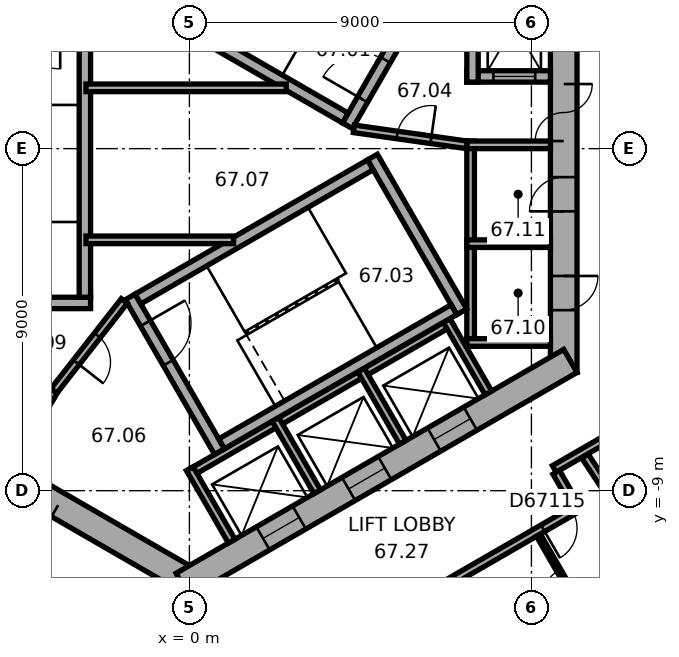
"""IFC4 building model, lengths in metres.
Left out: names, types, materials, properties, quantities, classifications, styles, units other than length and angle.
Written with IfcOpenShell. Run it as: python <this file> out.ifc"""

import sys

from ifc_helpers import new_model, si_unit, direction, frame, frame_2d, origin, place, context, subcontext, project, spatial, rectangle, extrude, element, fill, save


model = new_model("IFC4")
c1 = context("Model", 3, precision=1e-05, world=origin(), true_north=direction((0.0, 1.0)))
c2 = subcontext(c1, "Body", "Model", "MODEL_VIEW")
j1 = project(units=[si_unit("LENGTHUNIT", "METRE"), si_unit("PLANEANGLEUNIT", "RADIAN")], contexts=[c1])
p1 = place(None, origin())
s1 = spatial("IfcSite", under=j1, at=p1, CompositionType="ELEMENT")
p2 = place(p1, origin())
s2 = spatial("IfcBuilding", under=s1, at=p2, CompositionType="ELEMENT")
p3 = place(p2, frame((0.0, 0.0, 270.9)))
s3 = spatial("IfcBuildingStorey", under=s2, at=p3, CompositionType="ELEMENT", Elevation=270.9)
p4 = place(p3, frame((9.85, -5.889, 0.0), z_axis=(0.0, 0.0, 1.0), x_axis=(0.0, 1.0, 0.0)))
e1 = element("IfcWall", 1, at=p4, inside=s3, PredefinedType="SHEAR", context=c2, shape_type="SweptSolid", body=[
    extrude(rectangle(XDim=11.778, YDim=0.7, at=frame_2d((5.889, 0.0))), origin(), (0.0, 0.0, 1.0), 3.7),
])
p5 = place(p4, frame((6.089, 0.0, 0.0)))
e2 = element("IfcOpeningElement", 2, at=p5, cuts=e1, PredefinedType="OPENING", context=c2, shape_type="SweptSolid", body=[
    extrude(rectangle(XDim=1.5, YDim=2.1, at=frame_2d((0.75, 1.05))), frame((0.0, 0.36, 0.0), z_axis=(0.0, -1.0, 0.0), x_axis=(1.0, 0.0, 0.0)), (0.0, 0.0, 1.0), 0.72),
])
p6 = place(p4, frame((1.639, 0.0, 0.0)))
e3 = element("IfcOpeningElement", 3, at=p6, cuts=e1, PredefinedType="OPENING", context=c2, shape_type="SweptSolid", body=[
    extrude(rectangle(XDim=0.9, YDim=2.1, at=frame_2d((0.45, 1.05))), frame((0.0, 0.36, 0.0), z_axis=(0.0, -1.0, 0.0), x_axis=(1.0, 0.0, 0.0)), (0.0, 0.0, 1.0), 0.72),
])
p7 = place(p4, frame((4.239, 0.0, 0.0)))
e4 = element("IfcOpeningElement", 4, at=p7, cuts=e1, PredefinedType="OPENING", context=c2, shape_type="SweptSolid", body=[
    extrude(rectangle(XDim=0.9, YDim=2.1, at=frame_2d((0.45, 1.05))), frame((0.0, 0.36, 0.0), z_axis=(0.0, -1.0, 0.0), x_axis=(1.0, 0.0, 0.0)), (0.0, 0.0, 1.0), 0.72),
])
p8 = place(p3, frame((-10.025, -5.586, 0.0), z_axis=(0.0, 0.0, 1.0), x_axis=(0.866026453023, -0.499998182661, 0.0)))
e5 = element("IfcWall", 5, at=p8, inside=s3, PredefinedType="SHEAR", context=c2, shape_type="SweptSolid", body=[
    extrude(rectangle(XDim=11.778, YDim=0.7, at=frame_2d((5.889, 0.0))), origin(), (0.0, 0.0, 1.0), 3.7),
])
p9 = place(p8, frame((6.089, 0.0, 0.0)))
e6 = element("IfcOpeningElement", 6, at=p9, cuts=e5, PredefinedType="OPENING", context=c2, shape_type="SweptSolid", body=[
    extrude(rectangle(XDim=1.5, YDim=2.1, at=frame_2d((0.75, 1.05))), frame((0.0, 0.36, 0.0), z_axis=(0.0, -1.0, 0.0), x_axis=(1.0, 0.0, 0.0)), (0.0, 0.0, 1.0), 0.72),
])
p10 = place(p8, frame((1.539, 0.0, 0.0)))
e7 = element("IfcOpeningElement", 7, at=p10, cuts=e5, PredefinedType="OPENING", context=c2, shape_type="SweptSolid", body=[
    extrude(rectangle(XDim=1.1, YDim=2.1, at=frame_2d((0.55, 1.05))), frame((0.0, 0.36, 0.0), z_axis=(0.0, -1.0, 0.0), x_axis=(1.0, 0.0, 0.0)), (0.0, 0.0, 1.0), 0.72),
])
p11 = place(p8, frame((4.139, 0.0, 0.0)))
e8 = element("IfcOpeningElement", 8, at=p11, cuts=e5, PredefinedType="OPENING", context=c2, shape_type="SweptSolid", body=[
    extrude(rectangle(XDim=1.1, YDim=2.1, at=frame_2d((0.55, 1.05))), frame((0.0, 0.36, 0.0), z_axis=(0.0, -1.0, 0.0), x_axis=(1.0, 0.0, 0.0)), (0.0, 0.0, 1.0), 0.72),
])
p12 = place(p3, frame((-0.175, -11.475, 0.0), z_axis=(0.0, 0.0, 1.0), x_axis=(0.866026453023, 0.499998182661, 0.0)))
e9 = element("IfcWall", 9, at=p12, inside=s3, PredefinedType="SHEAR", context=c2, shape_type="SweptSolid", body=[
    extrude(rectangle(XDim=11.778, YDim=0.7, at=frame_2d((5.889, 0.0))), origin(), (0.0, 0.0, 1.0), 3.7),
])
p13 = place(p12, frame((2.439, 0.0, 0.0)))
e10 = element("IfcOpeningElement", 10, at=p13, cuts=e9, PredefinedType="OPENING", context=c2, shape_type="SweptSolid", body=[
    extrude(rectangle(XDim=1.1, YDim=2.1, at=frame_2d((0.55, 1.05))), frame((0.0, 0.36, 0.0), z_axis=(0.0, -1.0, 0.0), x_axis=(1.0, 0.0, 0.0)), (0.0, 0.0, 1.0), 0.72),
])
p14 = place(p12, frame((5.039, 0.0, 0.0)))
e11 = element("IfcOpeningElement", 11, at=p14, cuts=e9, PredefinedType="OPENING", context=c2, shape_type="SweptSolid", body=[
    extrude(rectangle(XDim=1.1, YDim=2.1, at=frame_2d((0.55, 1.05))), frame((0.0, 0.36, 0.0), z_axis=(0.0, -1.0, 0.0), x_axis=(1.0, 0.0, 0.0)), (0.0, 0.0, 1.0), 0.72),
])
p15 = place(p12, frame((7.639, 0.0, 0.0)))
e12 = element("IfcOpeningElement", 12, at=p15, cuts=e9, PredefinedType="OPENING", context=c2, shape_type="SweptSolid", body=[
    extrude(rectangle(XDim=1.1, YDim=2.1, at=frame_2d((0.55, 1.05))), frame((0.0, 0.36, 0.0), z_axis=(0.0, -1.0, 0.0), x_axis=(1.0, 0.0, 0.0)), (0.0, 0.0, 1.0), 0.72),
])
p16 = place(p3, frame((7.4, -5.2, 0.0), z_axis=(0.0, 0.0, 1.0), x_axis=(0.0, 1.0, 0.0)))
e13 = element("IfcWall", 13, at=p16, inside=s3, PredefinedType="PARTITIONING", context=c2, shape_type="SweptSolid", body=[
    extrude(rectangle(XDim=5.4, YDim=0.2, at=frame_2d((2.7, 0.0))), origin(), (0.0, 0.0, 1.0), 3.42),
])
for number, where, z_axis, x_axis in (
    (14, (7.3, -5.1, 0.0), (0.0, 0.0, 1.0), (1.0, 0.0, 0.0)),
    (15, (7.3, -2.5, 0.0), (0.0, 0.0, 1.0), (1.0, 0.0, 0.0)),
    (16, (7.3, 0.1, 0.0), (0.0, 0.0, 1.0), (1.0, 0.0, 0.0)),
):
    element("IfcWall", number, at=place(p3, frame(where, z_axis=z_axis, x_axis=x_axis)), inside=s3, PredefinedType="PARTITIONING", context=c2, shape_type="SweptSolid", body=[
        extrude(rectangle(XDim=2.2, YDim=0.2, at=frame_2d((1.1, 0.0))), origin(), (0.0, 0.0, 1.0), 3.42),
    ])
p17 = place(p3, frame((-8.203, -3.809, 0.0), z_axis=(0.0, 0.0, 1.0), x_axis=(0.866028230842, -0.499995103361, 0.0)))
e17 = element("IfcWall", 17, at=p17, inside=s3, PredefinedType="PARTITIONING", context=c2, shape_type="SweptSolid", body=[
    extrude(rectangle(XDim=5.4, YDim=0.2, at=frame_2d((2.7, 0.0))), origin(), (0.0, 0.0, 1.0), 3.42),
])
p18 = place(p3, frame((-3.563, -6.372, 0.0), z_axis=(0.0, 0.0, 1.0), x_axis=(-0.499994660107, -0.866028486751, 0.0)))
e18 = element("IfcWall", 18, at=p18, inside=s3, PredefinedType="PARTITIONING", context=c2, shape_type="SweptSolid", body=[
    extrude(rectangle(XDim=2.2, YDim=0.2, at=frame_2d((1.1, 0.0))), origin(), (0.0, 0.0, 1.0), 3.42),
])
p19 = place(p3, frame((-0.024, -8.559, 0.0), z_axis=(0.0, 0.0, 1.0), x_axis=(0.866026010844, 0.49999894854, 0.0)))
e19 = element("IfcWall", 19, at=p19, inside=s3, PredefinedType="PARTITIONING", context=c2, shape_type="SweptSolid", body=[
    extrude(rectangle(XDim=8.0, YDim=0.2, at=frame_2d((4.0, 0.0))), origin(), (0.0, 0.0, 1.0), 3.42),
])
for number, where, z_axis, x_axis in (
    (20, (0.013, -8.422, 0.0), (0.0, 0.0, 1.0), (0.5, -0.866, 0.0)),
    (21, (2.264, -7.122, 0.0), (0.0, 0.0, 1.0), (0.5, -0.866, 0.0)),
    (22, (4.516, -5.822, 0.0), (0.0, 0.0, 1.0), (0.5, -0.866, 0.0)),
    (23, (6.768, -4.522, 0.0), (0.0, 0.0, 1.0), (0.5, -0.866, 0.0)),
):
    element("IfcWall", number, at=place(p3, frame(where, z_axis=z_axis, x_axis=x_axis)), inside=s3, PredefinedType="PARTITIONING", context=c2, shape_type="SweptSolid", body=[
        extrude(rectangle(XDim=2.2, YDim=0.2, at=frame_2d((1.1, 0.0))), origin(), (0.0, 0.0, 1.0), 3.42),
    ])
p20 = place(p3, frame((4.158, 0.602, 0.0), z_axis=(0.0, 0.0, 1.0), x_axis=(0.499977259774, 0.866038532462, 0.0)))
e24 = element("IfcWall", 24, at=p20, inside=s3, PredefinedType="SHEAR", context=c2, shape_type="SweptSolid", body=[
    extrude(rectangle(XDim=4.7, YDim=0.3, at=frame_2d((2.35, 0.0))), origin(), (0.0, 0.0, 1.0), 3.42),
])
p21 = place(p20, frame((0.8, 0.0, 0.0)))
e25 = element("IfcOpeningElement", 25, at=p21, cuts=e24, PredefinedType="OPENING", context=c2, shape_type="SweptSolid", body=[
    extrude(rectangle(XDim=1.2, YDim=2.1, at=frame_2d((0.6, 1.05))), frame((0.0, 0.16, 0.0), z_axis=(0.0, -1.0, 0.0), x_axis=(1.0, 0.0, 0.0)), (0.0, 0.0, 1.0), 0.32),
])
p22 = place(p3, frame((4.103, 0.807, 0.0), z_axis=(0.0, 0.0, 1.0), x_axis=(-0.866027801685, 0.499995846692, 0.0)))
e26 = element("IfcWall", 26, at=p22, inside=s3, PredefinedType="SHEAR", context=c2, shape_type="SweptSolid", body=[
    extrude(rectangle(XDim=7.06, YDim=0.3, at=frame_2d((3.53, 0.0))), origin(), (0.0, 0.0, 1.0), 3.42),
])
p23 = place(p3, frame((-2.6, -4.06, 0.0), z_axis=(0.0, 0.0, 1.0), x_axis=(-1.0, 0.0, 0.0)))
e27 = element("IfcWall", 27, at=p23, inside=s3, PredefinedType="SHEAR", context=c2, shape_type="SweptSolid", body=[
    extrude(rectangle(XDim=4.7, YDim=0.3, at=frame_2d((2.35, 0.0))), origin(), (0.0, 0.0, 1.0), 3.42),
])
p24 = place(p3, frame((-2.75, 3.15, 0.0), z_axis=(0.0, 0.0, 1.0), x_axis=(0.0, -1.0, 0.0)))
e28 = element("IfcWall", 28, at=p24, inside=s3, PredefinedType="SHEAR", context=c2, shape_type="SweptSolid", body=[
    extrude(rectangle(XDim=7.06, YDim=0.3, at=frame_2d((3.53, 0.0))), origin(), (0.0, 0.0, 1.0), 3.42),
])
p25 = place(p3, frame((-1.558, -3.902, 0.0), z_axis=(0.0, 0.0, 1.0), x_axis=(0.499977259774, -0.866038532462, 0.0)))
e29 = element("IfcWall", 29, at=p25, inside=s3, PredefinedType="SHEAR", context=c2, shape_type="SweptSolid", body=[
    extrude(rectangle(XDim=4.7, YDim=0.3, at=frame_2d((2.35, 0.0))), origin(), (0.0, 0.0, 1.0), 3.42),
])
p26 = place(p25, frame((0.8, 0.0, 0.0)))
e30 = element("IfcOpeningElement", 30, at=p26, cuts=e29, PredefinedType="OPENING", context=c2, shape_type="SweptSolid", body=[
    extrude(rectangle(XDim=1.2, YDim=2.1, at=frame_2d((0.6, 1.05))), frame((0.0, 0.16, 0.0), z_axis=(0.0, -1.0, 0.0), x_axis=(1.0, 0.0, 0.0)), (0.0, 0.0, 1.0), 0.32),
])
p27 = place(p3, frame((4.816, -0.222, 0.0), z_axis=(0.0, 0.0, 1.0), x_axis=(0.499977259774, -0.866038532462, 0.0)))
e31 = element("IfcWall", 31, at=p27, inside=s3, PredefinedType="SHEAR", context=c2, shape_type="SweptSolid", body=[
    extrude(rectangle(XDim=4.7, YDim=0.3, at=frame_2d((2.35, 0.0))), origin(), (0.0, 0.0, 1.0), 3.42),
])
for number, where, z_axis, x_axis in (
    (32, (-1.353, -3.957, 0.0), (0.0, 0.0, 1.0), (0.866, 0.5, 0.0)),
    (33, (0.847, -7.767, 0.0), (0.0, 0.0, 1.0), (0.866, 0.5, 0.0)),
):
    element("IfcWall", number, at=place(p3, frame(where, z_axis=z_axis, x_axis=x_axis)), inside=s3, PredefinedType="SHEAR", context=c2, shape_type="SweptSolid", body=[
        extrude(rectangle(XDim=7.06, YDim=0.3, at=frame_2d((3.53, 0.0))), origin(), (0.0, 0.0, 1.0), 3.42),
    ])
p28 = place(p3, frame((7.3, 1.9, 0.0), z_axis=(0.0, 0.0, 1.0), x_axis=(1.0, 0.0, 0.0)))
e34 = element("IfcWall", 34, at=p28, inside=s3, PredefinedType="SHEAR", context=c2, shape_type="SweptSolid", body=[
    extrude(rectangle(XDim=2.2, YDim=0.3, at=frame_2d((1.1, 0.0))), origin(), (0.0, 0.0, 1.0), 3.42),
])
p29 = place(p28, frame((0.7, 0.0, 0.0)))
e35 = element("IfcOpeningElement", 35, at=p29, cuts=e34, PredefinedType="OPENING", context=c2, shape_type="SweptSolid", body=[
    extrude(rectangle(XDim=1.1, YDim=2.1, at=frame_2d((0.55, 1.05))), frame((0.0, 0.16, 0.0), z_axis=(0.0, -1.0, 0.0), x_axis=(1.0, 0.0, 0.0)), (0.0, 0.0, 1.0), 0.32),
])
p30 = place(p3, frame((7.45, 1.75, 0.0), z_axis=(0.0, 0.0, 1.0), x_axis=(0.0, 1.0, 0.0)))
e36 = element("IfcWall", 36, at=p30, inside=s3, PredefinedType="SHEAR", context=c2, shape_type="SweptSolid", body=[
    extrude(rectangle(XDim=3.35, YDim=0.3, at=frame_2d((1.675, 0.0))), origin(), (0.0, 0.0, 1.0), 3.42),
])
p31 = place(p3, frame((4.327, 0.521, 0.0), z_axis=(0.0, 0.0, 1.0), x_axis=(0.990124376366, -0.14019172346, 0.0)))
e37 = element("IfcWall", 37, at=p31, inside=s3, PredefinedType="PARTITIONING", context=c2, shape_type="SweptSolid", body=[
    extrude(rectangle(XDim=3.002, YDim=0.2, at=frame_2d((1.501, 0.0))), origin(), (0.0, 0.0, 1.0), 3.42),
])
p32 = place(p31, frame((1.15, 0.0, 0.0)))
e38 = element("IfcOpeningElement", 38, at=p32, cuts=e37, PredefinedType="OPENING", context=c2, shape_type="SweptSolid", body=[
    extrude(rectangle(XDim=0.9, YDim=2.1, at=frame_2d((0.45, 1.05))), frame((0.0, 0.11, 0.0), z_axis=(0.0, -1.0, 0.0), x_axis=(1.0, 0.0, 0.0)), (0.0, 0.0, 1.0), 0.22),
])
p33 = place(p3, frame((-1.712, -4.008, 0.0), z_axis=(0.0, 0.0, 1.0), x_axis=(-0.616549420702, -0.787316208287, 0.0)))
e39 = element("IfcWall", 39, at=p33, inside=s3, PredefinedType="PARTITIONING", context=c2, shape_type="SweptSolid", body=[
    extrude(rectangle(XDim=3.002, YDim=0.2, at=frame_2d((1.501, 0.0))), origin(), (0.0, 0.0, 1.0), 3.42),
])
p34 = place(p33, frame((1.15, 0.0, 0.0)))
e40 = element("IfcOpeningElement", 40, at=p34, cuts=e39, PredefinedType="OPENING", context=c2, shape_type="SweptSolid", body=[
    extrude(rectangle(XDim=0.9, YDim=2.1, at=frame_2d((0.45, 1.05))), frame((0.0, 0.11, 0.0), z_axis=(0.0, -1.0, 0.0), x_axis=(1.0, 0.0, 0.0)), (0.0, 0.0, 1.0), 0.22),
])
p35 = place(p3, frame((-2.72, -2.4, 0.0), z_axis=(0.0, 0.0, 1.0), x_axis=(1.0, 0.0, 0.0)))
e41 = element("IfcWall", 41, at=p35, inside=s3, PredefinedType="PARTITIONING", context=c2, shape_type="SweptSolid", body=[
    extrude(rectangle(XDim=3.883, YDim=0.2, at=frame_2d((1.941, 0.0))), origin(), (0.0, 0.0, 1.0), 3.42),
])
p36 = place(p3, frame((-2.72, 1.6, 0.0), z_axis=(0.0, 0.0, 1.0), x_axis=(1.0, 0.0, 0.0)))
e42 = element("IfcWall", 42, at=p36, inside=s3, PredefinedType="PARTITIONING", context=c2, shape_type="SweptSolid", body=[
    extrude(rectangle(XDim=5.269, YDim=0.2, at=frame_2d((2.634, 0.0))), origin(), (0.0, 0.0, 1.0), 3.42),
])
p37 = place(p3, frame((6.71, -11.485, 0.0), z_axis=(0.0, 0.0, 1.0), x_axis=(0.866021232452, 0.500007224889, 0.0)))
e43 = element("IfcWall", 43, at=p37, inside=s3, PredefinedType="PARTITIONING", context=c2, shape_type="SweptSolid", body=[
    extrude(rectangle(XDim=4.032, YDim=0.2, at=frame_2d((2.016, 0.0))), origin(), (0.0, 0.0, 1.0), 3.42),
])
p38 = place(p37, frame((2.991, 0.0, 0.0)))
e44 = element("IfcOpeningElement", 44, at=p38, cuts=e43, PredefinedType="OPENING", context=c2, shape_type="SweptSolid", body=[
    extrude(rectangle(XDim=0.9, YDim=2.1, at=frame_2d((0.45, 1.05))), frame((0.0, 0.11, 0.0), z_axis=(0.0, -1.0, 0.0), x_axis=(1.0, 0.0, 0.0)), (0.0, 0.0, 1.0), 0.22),
])
p39 = place(p3, frame((9.602, -8.428, 0.0), z_axis=(0.0, 0.0, 1.0), x_axis=(0.865999114786, 0.500045531117, 0.0)))
e45 = element("IfcWall", 45, at=p39, inside=s3, PredefinedType="PARTITIONING", context=c2, shape_type="SweptSolid", body=[
    extrude(rectangle(XDim=1.788, YDim=0.2, at=frame_2d((0.894, 0.0))), origin(), (0.0, 0.0, 1.0), 3.42),
])
p40 = place(p3, frame((10.152, -9.382, 0.0), z_axis=(0.0, 0.0, 1.0), x_axis=(-0.499968756647, 0.866043441391, 0.0)))
e46 = element("IfcWall", 46, at=p40, inside=s3, PredefinedType="PARTITIONING", context=c2, shape_type="SweptSolid", body=[
    extrude(rectangle(XDim=1.001, YDim=0.2, at=frame_2d((0.5, 0.0))), origin(), (0.0, 0.0, 1.0), 3.42),
])
p41 = place(p3, frame((10.705, -12.804, 0.0), z_axis=(0.0, 0.0, 1.0), x_axis=(-0.500026023896, 0.86601037836, 0.0)))
e47 = element("IfcWall", 47, at=p41, inside=s3, PredefinedType="PARTITIONING", context=c2, shape_type="SweptSolid", body=[
    extrude(rectangle(XDim=3.04, YDim=0.12, at=frame_2d((1.52, 0.0))), origin(), (0.0, 0.0, 1.0), 3.42),
])
p42 = place(p41, frame((1.07, 0.0, 0.0)))
e48 = element("IfcOpeningElement", 48, at=p42, cuts=e47, PredefinedType="OPENING", context=c2, shape_type="SweptSolid", body=[
    extrude(rectangle(XDim=0.9, YDim=2.1, at=frame_2d((0.45, 1.05))), frame((0.0, 0.07, 0.0), z_axis=(0.0, -1.0, 0.0), x_axis=(1.0, 0.0, 0.0)), (0.0, 0.0, 1.0), 0.14),
])
p43 = place(p3, frame((13.698, -13.059, 0.0), z_axis=(0.0, 0.0, 1.0), x_axis=(-0.551927229301, 0.833892279348, 0.0)))
e49 = element("IfcWall", 49, at=p43, inside=s3, PredefinedType="PARTITIONING", context=c2, shape_type="SweptSolid", body=[
    extrude(rectangle(XDim=5.96, YDim=0.2, at=frame_2d((2.98, 0.0))), origin(), (0.0, 0.0, 1.0), 2.87),
])
p44 = place(p5, origin())
e50 = element("IfcDoor", 50, at=p44, inside=s3, OperationType="DOUBLE_DOOR_SINGLE_SWING", PredefinedType="DOOR", context=c2, shape_type="SweptSolid", body=[
    extrude(rectangle(XDim=1.5, YDim=2.1, at=frame_2d((0.75, 1.05))), frame((0.0, 0.025, 0.0), z_axis=(0.0, -1.0, 0.0), x_axis=(1.0, 0.0, 0.0)), (0.0, 0.0, 1.0), 0.05),
])
fill(e2, e50)
p45 = place(p9, origin())
e51 = element("IfcDoor", 51, at=p45, inside=s3, OperationType="DOUBLE_DOOR_SINGLE_SWING", PredefinedType="DOOR", context=c2, shape_type="SweptSolid", body=[
    extrude(rectangle(XDim=1.5, YDim=2.1, at=frame_2d((0.75, 1.05))), frame((0.0, 0.025, 0.0), z_axis=(0.0, -1.0, 0.0), x_axis=(1.0, 0.0, 0.0)), (0.0, 0.0, 1.0), 0.05),
])
fill(e6, e51)
p46 = place(p21, origin())
e52 = element("IfcDoor", 52, at=p46, inside=s3, OperationType="SINGLE_SWING_RIGHT", PredefinedType="DOOR", context=c2, shape_type="SweptSolid", body=[
    extrude(rectangle(XDim=1.2, YDim=2.1, at=frame_2d((0.6, 1.05))), frame((0.0, 0.025, 0.0), z_axis=(0.0, -1.0, 0.0), x_axis=(1.0, 0.0, 0.0)), (0.0, 0.0, 1.0), 0.05),
])
fill(e25, e52)
p47 = place(p26, origin())
e53 = element("IfcDoor", 53, at=p47, inside=s3, OperationType="SINGLE_SWING_RIGHT", PredefinedType="DOOR", context=c2, shape_type="SweptSolid", body=[
    extrude(rectangle(XDim=1.2, YDim=2.1, at=frame_2d((0.6, 1.05))), frame((0.0, 0.025, 0.0), z_axis=(0.0, -1.0, 0.0), x_axis=(1.0, 0.0, 0.0)), (0.0, 0.0, 1.0), 0.05),
])
fill(e30, e53)
p48 = place(p32, origin())
e54 = element("IfcDoor", 54, at=p48, inside=s3, OperationType="SINGLE_SWING_LEFT", PredefinedType="DOOR", context=c2, shape_type="SweptSolid", body=[
    extrude(rectangle(XDim=0.9, YDim=2.1, at=frame_2d((0.45, 1.05))), frame((0.0, 0.025, 0.0), z_axis=(0.0, -1.0, 0.0), x_axis=(1.0, 0.0, 0.0)), (0.0, 0.0, 1.0), 0.05),
])
fill(e38, e54)
p49 = place(p34, origin())
e55 = element("IfcDoor", 55, at=p49, inside=s3, OperationType="SINGLE_SWING_LEFT", PredefinedType="DOOR", context=c2, shape_type="SweptSolid", body=[
    extrude(rectangle(XDim=0.9, YDim=2.1, at=frame_2d((0.45, 1.05))), frame((0.0, 0.025, 0.0), z_axis=(0.0, -1.0, 0.0), x_axis=(1.0, 0.0, 0.0)), (0.0, 0.0, 1.0), 0.05),
])
fill(e40, e55)
p50 = place(p6, origin())
e56 = element("IfcDoor", 56, at=p50, inside=s3, OperationType="SINGLE_SWING_LEFT", PredefinedType="DOOR", context=c2, shape_type="SweptSolid", body=[
    extrude(rectangle(XDim=0.9, YDim=2.1, at=frame_2d((0.45, 1.05))), frame((0.0, 0.025, 0.0), z_axis=(0.0, -1.0, 0.0), x_axis=(1.0, 0.0, 0.0)), (0.0, 0.0, 1.0), 0.05),
])
fill(e3, e56)
p51 = place(p7, origin())
e57 = element("IfcDoor", 57, at=p51, inside=s3, OperationType="SINGLE_SWING_LEFT", PredefinedType="DOOR", context=c2, shape_type="SweptSolid", body=[
    extrude(rectangle(XDim=0.9, YDim=2.1, at=frame_2d((0.45, 1.05))), frame((0.0, 0.025, 0.0), z_axis=(0.0, -1.0, 0.0), x_axis=(1.0, 0.0, 0.0)), (0.0, 0.0, 1.0), 0.05),
])
fill(e4, e57)
p52 = place(p29, origin())
e58 = element("IfcDoor", 58, at=p52, inside=s3, OperationType="DOUBLE_DOOR_SLIDING", PredefinedType="DOOR", context=c2, shape_type="SweptSolid", body=[
    extrude(rectangle(XDim=1.1, YDim=2.1, at=frame_2d((0.55, 1.05))), frame((0.0, 0.025, 0.0), z_axis=(0.0, -1.0, 0.0), x_axis=(1.0, 0.0, 0.0)), (0.0, 0.0, 1.0), 0.05),
])
fill(e35, e58)
p53 = place(p13, origin())
e59 = element("IfcDoor", 59, at=p53, inside=s3, OperationType="DOUBLE_DOOR_SLIDING", PredefinedType="DOOR", context=c2, shape_type="SweptSolid", body=[
    extrude(rectangle(XDim=1.1, YDim=2.1, at=frame_2d((0.55, 1.05))), frame((0.0, 0.025, 0.0), z_axis=(0.0, -1.0, 0.0), x_axis=(1.0, 0.0, 0.0)), (0.0, 0.0, 1.0), 0.05),
])
fill(e10, e59)
p54 = place(p14, origin())
e60 = element("IfcDoor", 60, at=p54, inside=s3, OperationType="DOUBLE_DOOR_SLIDING", PredefinedType="DOOR", context=c2, shape_type="SweptSolid", body=[
    extrude(rectangle(XDim=1.1, YDim=2.1, at=frame_2d((0.55, 1.05))), frame((0.0, 0.025, 0.0), z_axis=(0.0, -1.0, 0.0), x_axis=(1.0, 0.0, 0.0)), (0.0, 0.0, 1.0), 0.05),
])
fill(e11, e60)
p55 = place(p15, origin())
e61 = element("IfcDoor", 61, at=p55, inside=s3, OperationType="DOUBLE_DOOR_SLIDING", PredefinedType="DOOR", context=c2, shape_type="SweptSolid", body=[
    extrude(rectangle(XDim=1.1, YDim=2.1, at=frame_2d((0.55, 1.05))), frame((0.0, 0.025, 0.0), z_axis=(0.0, -1.0, 0.0), x_axis=(1.0, 0.0, 0.0)), (0.0, 0.0, 1.0), 0.05),
])
fill(e12, e61)
p56 = place(p38, origin())
e62 = element("IfcDoor", 62, at=p56, inside=s3, OperationType="SINGLE_SWING_LEFT", PredefinedType="DOOR", context=c2, shape_type="SweptSolid", body=[
    extrude(rectangle(XDim=0.9, YDim=2.1, at=frame_2d((0.45, 1.05))), frame((0.0, 0.025, 0.0), z_axis=(0.0, -1.0, 0.0), x_axis=(1.0, 0.0, 0.0)), (0.0, 0.0, 1.0), 0.05),
])
fill(e44, e62)
p57 = place(p42, origin())
e63 = element("IfcDoor", 63, at=p57, inside=s3, OperationType="SINGLE_SWING_LEFT", PredefinedType="DOOR", context=c2, shape_type="SweptSolid", body=[
    extrude(rectangle(XDim=0.9, YDim=2.1, at=frame_2d((0.45, 1.05))), frame((0.0, 0.025, 0.0), z_axis=(0.0, -1.0, 0.0), x_axis=(1.0, 0.0, 0.0)), (0.0, 0.0, 1.0), 0.05),
])
fill(e48, e63)
save(model, sys.argv[1])
